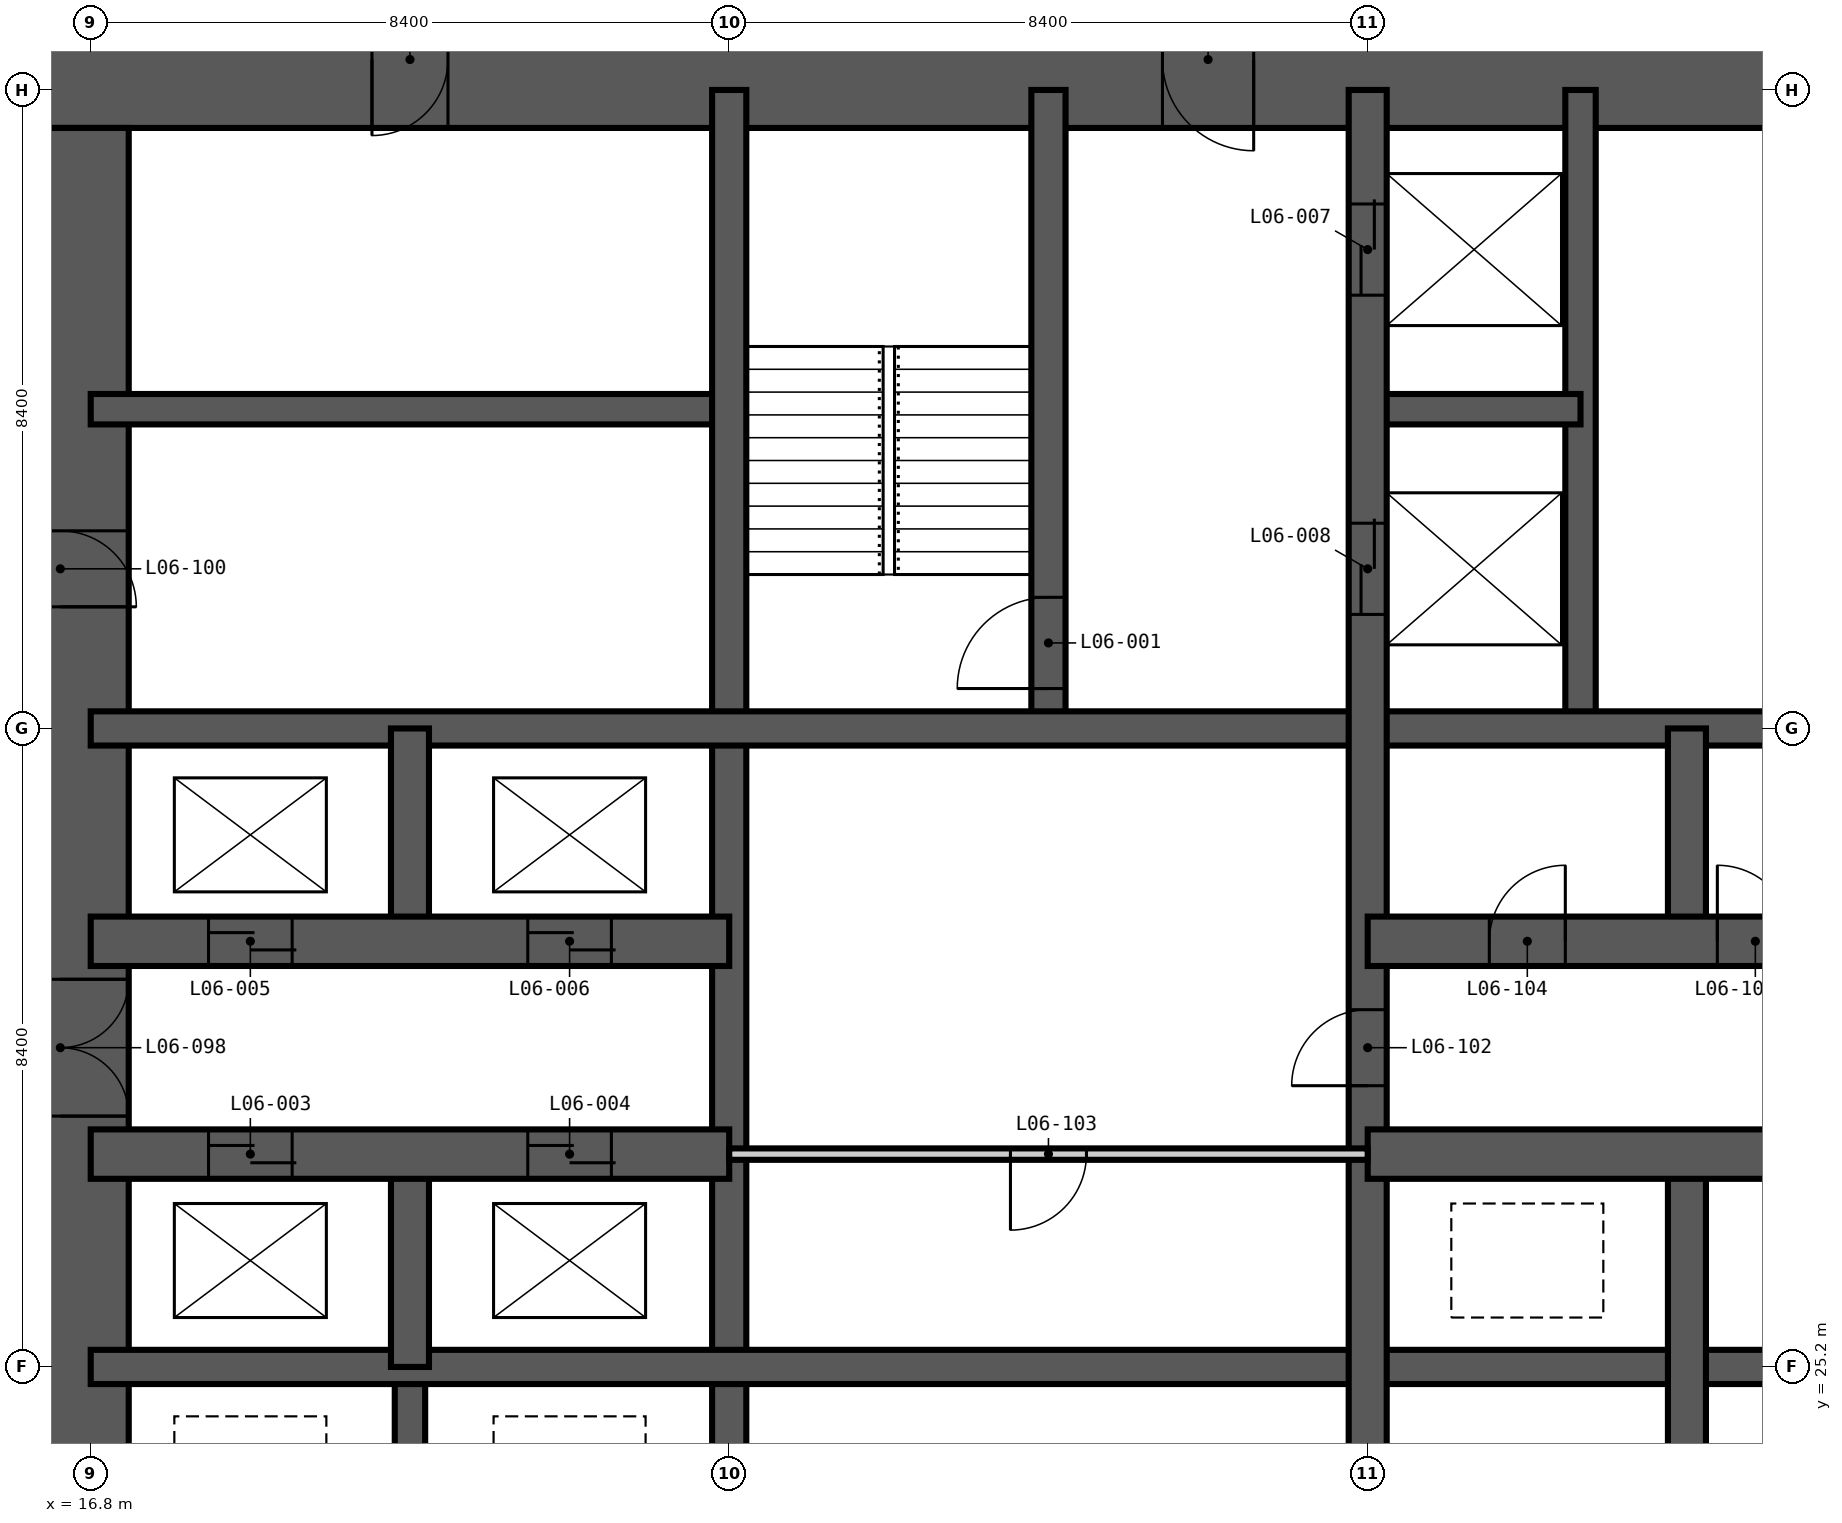
"""IFC4 building model, lengths in metres.
Left out: names, types, materials, properties, quantities, classifications, styles, units other than length and angle.
Written with IfcOpenShell. Run it as: python <this file> out.ifc"""

import sys

from ifc_helpers import new_model, si_unit, direction, frame, frame_2d, origin, place, context, subcontext, project, spatial, rectangle, extrude, element, fill, save


model = new_model("IFC4")
c1 = context("Model", 3, precision=1e-05, world=origin(), true_north=direction((0.0, 1.0)))
c2 = subcontext(c1, "Body", "Model", "MODEL_VIEW")
j1 = project(units=[si_unit("LENGTHUNIT", "METRE"), si_unit("PLANEANGLEUNIT", "RADIAN")], contexts=[c1])
p1 = place(None, origin())
s1 = spatial("IfcSite", under=j1, at=p1, CompositionType="ELEMENT")
p2 = place(p1, origin())
s2 = spatial("IfcBuilding", under=s1, at=p2, CompositionType="ELEMENT")
p3 = place(p2, frame((0.0, 0.0, 30.6)))
s3 = spatial("IfcBuildingStorey", under=s2, at=p3, CompositionType="ELEMENT", Elevation=30.6)
p4 = place(p3, frame((43.3, 42.4, -0.35), z_axis=(0.0, 0.0, 1.0), x_axis=(-1.0, 0.0, 0.0)))
e1 = element("IfcWall", 1, at=p4, inside=s3, PredefinedType="SHEAR", context=c2, shape_type="SweptSolid", body=[
    extrude(rectangle(XDim=27.8, YDim=1.8, at=frame_2d((13.9, 0.0))), origin(), (0.0, 0.0, 1.0), 3.6),
])
p5 = place(p4, frame((21.8, 0.0, 0.35)))
e2 = element("IfcOpeningElement", 2, at=p5, cuts=e1, PredefinedType="OPENING", context=c2, shape_type="SweptSolid", body=[
    extrude(rectangle(XDim=1.0, YDim=2.1, at=frame_2d((0.5, 1.05))), frame((0.0, 0.91, 0.0), z_axis=(0.0, -1.0, 0.0), x_axis=(1.0, 0.0, 0.0)), (0.0, 0.0, 1.0), 1.82),
])
p6 = place(p4, frame((11.2, 0.0, 0.35)))
e3 = element("IfcOpeningElement", 3, at=p6, cuts=e1, PredefinedType="OPENING", context=c2, shape_type="SweptSolid", body=[
    extrude(rectangle(XDim=1.2, YDim=2.2, at=frame_2d((0.6, 1.1))), frame((0.0, 0.91, 0.0), z_axis=(0.0, -1.0, 0.0), x_axis=(1.0, 0.0, 0.0)), (0.0, 0.0, 1.0), 1.82),
])
p7 = place(p3, frame((16.4, 41.5, -0.35), z_axis=(0.0, 0.0, 1.0), x_axis=(0.0, -1.0, 0.0)))
e4 = element("IfcWall", 4, at=p7, inside=s3, PredefinedType="SHEAR", context=c2, shape_type="SweptSolid", body=[
    extrude(rectangle(XDim=24.2, YDim=1.8, at=frame_2d((12.1, 0.0))), origin(), (0.0, 0.0, 1.0), 3.6),
])
p8 = place(p7, frame((11.2, 0.0, 0.35)))
e5 = element("IfcOpeningElement", 5, at=p8, cuts=e4, PredefinedType="OPENING", context=c2, shape_type="SweptSolid", body=[
    extrude(rectangle(XDim=1.8, YDim=2.2, at=frame_2d((0.9, 1.1))), frame((0.0, 0.91, 0.0), z_axis=(0.0, -1.0, 0.0), x_axis=(1.0, 0.0, 0.0)), (0.0, 0.0, 1.0), 1.82),
])
p9 = place(p7, frame((20.0, 0.0, 0.35)))
e6 = element("IfcOpeningElement", 6, at=p9, cuts=e4, PredefinedType="OPENING", context=c2, shape_type="SweptSolid", body=[
    extrude(rectangle(XDim=1.0, YDim=2.1, at=frame_2d((0.5, 1.05))), frame((0.0, 0.91, 0.0), z_axis=(0.0, -1.0, 0.0), x_axis=(1.0, 0.0, 0.0)), (0.0, 0.0, 1.0), 1.82),
])
p10 = place(p7, frame((5.3, 0.0, 0.35)))
e7 = element("IfcOpeningElement", 7, at=p10, cuts=e4, PredefinedType="OPENING", context=c2, shape_type="SweptSolid", body=[
    extrude(rectangle(XDim=1.0, YDim=2.1, at=frame_2d((0.5, 1.05))), frame((0.0, 0.91, 0.0), z_axis=(0.0, -1.0, 0.0), x_axis=(1.0, 0.0, 0.0)), (0.0, 0.0, 1.0), 1.82),
])
p11 = place(p3, frame((21.0, 22.4, -0.35), z_axis=(0.0, 0.0, 1.0), x_axis=(0.0, 1.0, 0.0)))
e8 = element("IfcWall", 8, at=p11, inside=s3, PredefinedType="SHEAR", context=c2, shape_type="SweptSolid", body=[
    extrude(rectangle(XDim=2.8, YDim=0.4, at=frame_2d((1.4, 0.0))), origin(), (0.0, 0.0, 1.0), 3.6),
])
for number, where, z_axis, x_axis in (
    (9, (36.4, 33.6, -0.35), (0.0, 0.0, 1.0), (0.0, 1.0, 0.0)),
    (10, (16.8, 37.8, -0.35), (0.0, 0.0, 1.0), (1.0, 0.0, 0.0)),
):
    element("IfcWall", number, at=place(p3, frame(where, z_axis=z_axis, x_axis=x_axis)), inside=s3, PredefinedType="SHEAR", context=c2, shape_type="SweptSolid", body=[
        extrude(rectangle(XDim=8.4, YDim=0.4, at=frame_2d((4.2, 0.0))), origin(), (0.0, 0.0, 1.0), 3.6),
    ])
p12 = place(p3, frame((33.6, 37.8, -0.35), z_axis=(0.0, 0.0, 1.0), x_axis=(1.0, 0.0, 0.0)))
e11 = element("IfcWall", 11, at=p12, inside=s3, PredefinedType="SHEAR", context=c2, shape_type="SweptSolid", body=[
    extrude(rectangle(XDim=2.8, YDim=0.4, at=frame_2d((1.4, 0.0))), origin(), (0.0, 0.0, 1.0), 3.6),
])
p13 = place(p3, frame((25.2, 16.8, -0.35), z_axis=(0.0, 0.0, 1.0), x_axis=(0.0, 1.0, 0.0)))
e12 = element("IfcWall", 12, at=p13, inside=s3, PredefinedType="SHEAR", context=c2, shape_type="SweptSolid", body=[
    extrude(rectangle(XDim=25.2, YDim=0.45, at=frame_2d((12.6, 0.0))), origin(), (0.0, 0.0, 1.0), 3.6),
])
p14 = place(p3, frame((29.4, 33.6, -0.35), z_axis=(0.0, 0.0, 1.0), x_axis=(0.0, 1.0, 0.0)))
e13 = element("IfcWall", 13, at=p14, inside=s3, PredefinedType="SHEAR", context=c2, shape_type="SweptSolid", body=[
    extrude(rectangle(XDim=8.4, YDim=0.45, at=frame_2d((4.2, 0.0))), origin(), (0.0, 0.0, 1.0), 3.6),
])
p15 = place(p14, frame((0.525, 0.0, 0.35)))
e14 = element("IfcOpeningElement", 14, at=p15, cuts=e13, PredefinedType="OPENING", context=c2, shape_type="SweptSolid", body=[
    extrude(rectangle(XDim=1.2, YDim=2.2, at=frame_2d((0.6, 1.1))), frame((0.0, 0.235, 0.0), z_axis=(0.0, -1.0, 0.0), x_axis=(1.0, 0.0, 0.0)), (0.0, 0.0, 1.0), 0.47),
])
for number, where, z_axis, x_axis in (
    (15, (16.8, 25.2, -0.35), (0.0, 0.0, 1.0), (1.0, 0.0, 0.0)),
    (16, (16.8, 33.6, -0.35), (0.0, 0.0, 1.0), (1.0, 0.0, 0.0)),
):
    element("IfcWall", number, at=place(p3, frame(where, z_axis=z_axis, x_axis=x_axis)), inside=s3, PredefinedType="SHEAR", context=c2, shape_type="SweptSolid", body=[
        extrude(rectangle(XDim=25.2, YDim=0.45, at=frame_2d((12.6, 0.0))), origin(), (0.0, 0.0, 1.0), 3.6),
    ])
for number, where, z_axis, x_axis in (
    (17, (21.0, 25.2, -0.35), (0.0, 0.0, 1.0), (0.0, 1.0, 0.0)),
    (18, (21.0, 30.8, -0.35), (0.0, 0.0, 1.0), (0.0, 1.0, 0.0)),
):
    element("IfcWall", number, at=place(p3, frame(where, z_axis=z_axis, x_axis=x_axis)), inside=s3, PredefinedType="SHEAR", context=c2, shape_type="SweptSolid", body=[
        extrude(rectangle(XDim=2.8, YDim=0.5, at=frame_2d((1.4, 0.0))), origin(), (0.0, 0.0, 1.0), 3.6),
    ])
p16 = place(p3, frame((33.6, 16.8, -0.35), z_axis=(0.0, 0.0, 1.0), x_axis=(0.0, 1.0, 0.0)))
e19 = element("IfcWall", 19, at=p16, inside=s3, PredefinedType="SHEAR", context=c2, shape_type="SweptSolid", body=[
    extrude(rectangle(XDim=25.2, YDim=0.5, at=frame_2d((12.6, 0.0))), origin(), (0.0, 0.0, 1.0), 3.6),
])
p17 = place(p16, frame((22.5, 0.0, 0.35)))
e20 = element("IfcOpeningElement", 20, at=p17, cuts=e19, PredefinedType="OPENING", context=c2, shape_type="SweptSolid", body=[
    extrude(rectangle(XDim=1.2, YDim=2.2, at=frame_2d((0.6, 1.1))), frame((0.0, 0.26, 0.0), z_axis=(0.0, -1.0, 0.0), x_axis=(1.0, 0.0, 0.0)), (0.0, 0.0, 1.0), 0.52),
])
p18 = place(p16, frame((18.3, 0.0, 0.35)))
e21 = element("IfcOpeningElement", 21, at=p18, cuts=e19, PredefinedType="OPENING", context=c2, shape_type="SweptSolid", body=[
    extrude(rectangle(XDim=1.2, YDim=2.2, at=frame_2d((0.6, 1.1))), frame((0.0, 0.26, 0.0), z_axis=(0.0, -1.0, 0.0), x_axis=(1.0, 0.0, 0.0)), (0.0, 0.0, 1.0), 0.52),
])
p19 = place(p16, frame((12.1, 0.0, 0.35)))
e22 = element("IfcOpeningElement", 22, at=p19, cuts=e19, PredefinedType="OPENING", context=c2, shape_type="SweptSolid", body=[
    extrude(rectangle(XDim=1.0, YDim=2.1, at=frame_2d((0.5, 1.05))), frame((0.0, 0.26, 0.0), z_axis=(0.0, -1.0, 0.0), x_axis=(1.0, 0.0, 0.0)), (0.0, 0.0, 1.0), 0.52),
])
p20 = place(p3, frame((37.8, 16.8, -0.35), z_axis=(0.0, 0.0, 1.0), x_axis=(0.0, 1.0, 0.0)))
e23 = element("IfcWall", 23, at=p20, inside=s3, PredefinedType="SHEAR", context=c2, shape_type="SweptSolid", body=[
    extrude(rectangle(XDim=11.2, YDim=0.5, at=frame_2d((5.6, 0.0))), origin(), (0.0, 0.0, 1.0), 3.6),
])
p21 = place(p3, frame((37.8, 30.8, -0.35), z_axis=(0.0, 0.0, 1.0), x_axis=(0.0, 1.0, 0.0)))
e24 = element("IfcWall", 24, at=p21, inside=s3, PredefinedType="SHEAR", context=c2, shape_type="SweptSolid", body=[
    extrude(rectangle(XDim=2.8, YDim=0.5, at=frame_2d((1.4, 0.0))), origin(), (0.0, 0.0, 1.0), 3.6),
])
p22 = place(p3, frame((16.8, 28.0, -0.35), z_axis=(0.0, 0.0, 1.0), x_axis=(1.0, 0.0, 0.0)))
e25 = element("IfcWall", 25, at=p22, inside=s3, PredefinedType="SHEAR", context=c2, shape_type="SweptSolid", body=[
    extrude(rectangle(XDim=8.4, YDim=0.65, at=frame_2d((4.2, 0.0))), origin(), (0.0, 0.0, 1.0), 3.6),
])
p23 = place(p22, frame((1.55, 0.0, 0.35)))
e26 = element("IfcOpeningElement", 26, at=p23, cuts=e25, PredefinedType="OPENING", context=c2, shape_type="SweptSolid", body=[
    extrude(rectangle(XDim=1.1, YDim=2.2, at=frame_2d((0.55, 1.1))), frame((0.0, 0.335, 0.0), z_axis=(0.0, -1.0, 0.0), x_axis=(1.0, 0.0, 0.0)), (0.0, 0.0, 1.0), 0.67),
])
p24 = place(p22, frame((5.75, 0.0, 0.35)))
e27 = element("IfcOpeningElement", 27, at=p24, cuts=e25, PredefinedType="OPENING", context=c2, shape_type="SweptSolid", body=[
    extrude(rectangle(XDim=1.1, YDim=2.2, at=frame_2d((0.55, 1.1))), frame((0.0, 0.335, 0.0), z_axis=(0.0, -1.0, 0.0), x_axis=(1.0, 0.0, 0.0)), (0.0, 0.0, 1.0), 0.67),
])
p25 = place(p3, frame((33.6, 28.0, -0.35), z_axis=(0.0, 0.0, 1.0), x_axis=(1.0, 0.0, 0.0)))
e28 = element("IfcWall", 28, at=p25, inside=s3, PredefinedType="SHEAR", context=c2, shape_type="SweptSolid", body=[
    extrude(rectangle(XDim=8.4, YDim=0.65, at=frame_2d((4.2, 0.0))), origin(), (0.0, 0.0, 1.0), 3.6),
])
p26 = place(p3, frame((16.8, 30.8, -0.35), z_axis=(0.0, 0.0, 1.0), x_axis=(1.0, 0.0, 0.0)))
e29 = element("IfcWall", 29, at=p26, inside=s3, PredefinedType="SHEAR", context=c2, shape_type="SweptSolid", body=[
    extrude(rectangle(XDim=8.4, YDim=0.65, at=frame_2d((4.2, 0.0))), origin(), (0.0, 0.0, 1.0), 3.6),
])
p27 = place(p26, frame((1.55, 0.0, 0.35)))
e30 = element("IfcOpeningElement", 30, at=p27, cuts=e29, PredefinedType="OPENING", context=c2, shape_type="SweptSolid", body=[
    extrude(rectangle(XDim=1.1, YDim=2.2, at=frame_2d((0.55, 1.1))), frame((0.0, 0.335, 0.0), z_axis=(0.0, -1.0, 0.0), x_axis=(1.0, 0.0, 0.0)), (0.0, 0.0, 1.0), 0.67),
])
p28 = place(p26, frame((5.75, 0.0, 0.35)))
e31 = element("IfcOpeningElement", 31, at=p28, cuts=e29, PredefinedType="OPENING", context=c2, shape_type="SweptSolid", body=[
    extrude(rectangle(XDim=1.1, YDim=2.2, at=frame_2d((0.55, 1.1))), frame((0.0, 0.335, 0.0), z_axis=(0.0, -1.0, 0.0), x_axis=(1.0, 0.0, 0.0)), (0.0, 0.0, 1.0), 0.67),
])
p29 = place(p3, frame((33.6, 30.8, -0.35), z_axis=(0.0, 0.0, 1.0), x_axis=(1.0, 0.0, 0.0)))
e32 = element("IfcWall", 32, at=p29, inside=s3, PredefinedType="SHEAR", context=c2, shape_type="SweptSolid", body=[
    extrude(rectangle(XDim=8.4, YDim=0.65, at=frame_2d((4.2, 0.0))), origin(), (0.0, 0.0, 1.0), 3.6),
])
p30 = place(p29, frame((1.6, 0.0, 0.35)))
e33 = element("IfcOpeningElement", 33, at=p30, cuts=e32, PredefinedType="OPENING", context=c2, shape_type="SweptSolid", body=[
    extrude(rectangle(XDim=1.0, YDim=2.1, at=frame_2d((0.5, 1.05))), frame((0.0, 0.335, 0.0), z_axis=(0.0, -1.0, 0.0), x_axis=(1.0, 0.0, 0.0)), (0.0, 0.0, 1.0), 0.67),
])
p31 = place(p29, frame((4.6, 0.0, 0.35)))
e34 = element("IfcOpeningElement", 34, at=p31, cuts=e32, PredefinedType="OPENING", context=c2, shape_type="SweptSolid", body=[
    extrude(rectangle(XDim=1.0, YDim=2.1, at=frame_2d((0.5, 1.05))), frame((0.0, 0.335, 0.0), z_axis=(0.0, -1.0, 0.0), x_axis=(1.0, 0.0, 0.0)), (0.0, 0.0, 1.0), 0.67),
])
p32 = place(p3, frame((25.2, 28.0, 0.0), z_axis=(0.0, 0.0, 1.0), x_axis=(1.0, 0.0, 0.0)))
e35 = element("IfcWall", 35, at=p32, inside=s3, PredefinedType="PARTITIONING", context=c2, shape_type="SweptSolid", body=[
    extrude(rectangle(XDim=8.4, YDim=0.15, at=frame_2d((4.2, 0.0))), origin(), (0.0, 0.0, 1.0), 3.25),
])
p33 = place(p32, frame((3.7, 0.0, 0.0)))
e36 = element("IfcOpeningElement", 36, at=p33, cuts=e35, PredefinedType="OPENING", context=c2, shape_type="SweptSolid", body=[
    extrude(rectangle(XDim=1.0, YDim=2.1, at=frame_2d((0.5, 1.05))), frame((0.0, 0.085, 0.0), z_axis=(0.0, -1.0, 0.0), x_axis=(1.0, 0.0, 0.0)), (0.0, 0.0, 1.0), 0.17),
])
p34 = place(p15, origin())
e37 = element("IfcDoor", 37, at=p34, inside=s3, OperationType="SINGLE_SWING_LEFT", PredefinedType="DOOR", context=c2, shape_type="SweptSolid", body=[
    extrude(rectangle(XDim=1.2, YDim=2.2, at=frame_2d((0.6, 1.1))), frame((0.0, 0.025, 0.0), z_axis=(0.0, -1.0, 0.0), x_axis=(1.0, 0.0, 0.0)), (0.0, 0.0, 1.0), 0.05),
])
fill(e14, e37)
p35 = place(p23, origin())
e38 = element("IfcDoor", 38, at=p35, inside=s3, OperationType="DOUBLE_DOOR_SLIDING", PredefinedType="DOOR", context=c2, shape_type="SweptSolid", body=[
    extrude(rectangle(XDim=1.1, YDim=2.2, at=frame_2d((0.55, 1.1))), frame((0.0, 0.025, 0.0), z_axis=(0.0, -1.0, 0.0), x_axis=(1.0, 0.0, 0.0)), (0.0, 0.0, 1.0), 0.05),
])
fill(e26, e38)
p36 = place(p24, origin())
e39 = element("IfcDoor", 39, at=p36, inside=s3, OperationType="DOUBLE_DOOR_SLIDING", PredefinedType="DOOR", context=c2, shape_type="SweptSolid", body=[
    extrude(rectangle(XDim=1.1, YDim=2.2, at=frame_2d((0.55, 1.1))), frame((0.0, 0.025, 0.0), z_axis=(0.0, -1.0, 0.0), x_axis=(1.0, 0.0, 0.0)), (0.0, 0.0, 1.0), 0.05),
])
fill(e27, e39)
p37 = place(p27, origin())
e40 = element("IfcDoor", 40, at=p37, inside=s3, OperationType="DOUBLE_DOOR_SLIDING", PredefinedType="DOOR", context=c2, shape_type="SweptSolid", body=[
    extrude(rectangle(XDim=1.1, YDim=2.2, at=frame_2d((0.55, 1.1))), frame((0.0, 0.025, 0.0), z_axis=(0.0, -1.0, 0.0), x_axis=(1.0, 0.0, 0.0)), (0.0, 0.0, 1.0), 0.05),
])
fill(e30, e40)
p38 = place(p28, origin())
e41 = element("IfcDoor", 41, at=p38, inside=s3, OperationType="DOUBLE_DOOR_SLIDING", PredefinedType="DOOR", context=c2, shape_type="SweptSolid", body=[
    extrude(rectangle(XDim=1.1, YDim=2.2, at=frame_2d((0.55, 1.1))), frame((0.0, 0.025, 0.0), z_axis=(0.0, -1.0, 0.0), x_axis=(1.0, 0.0, 0.0)), (0.0, 0.0, 1.0), 0.05),
])
fill(e31, e41)
p39 = place(p17, origin())
e42 = element("IfcDoor", 42, at=p39, inside=s3, OperationType="DOUBLE_DOOR_SLIDING", PredefinedType="DOOR", context=c2, shape_type="SweptSolid", body=[
    extrude(rectangle(XDim=1.2, YDim=2.2, at=frame_2d((0.6, 1.1))), frame((0.0, 0.025, 0.0), z_axis=(0.0, -1.0, 0.0), x_axis=(1.0, 0.0, 0.0)), (0.0, 0.0, 1.0), 0.05),
])
fill(e20, e42)
p40 = place(p18, origin())
e43 = element("IfcDoor", 43, at=p40, inside=s3, OperationType="DOUBLE_DOOR_SLIDING", PredefinedType="DOOR", context=c2, shape_type="SweptSolid", body=[
    extrude(rectangle(XDim=1.2, YDim=2.2, at=frame_2d((0.6, 1.1))), frame((0.0, 0.025, 0.0), z_axis=(0.0, -1.0, 0.0), x_axis=(1.0, 0.0, 0.0)), (0.0, 0.0, 1.0), 0.05),
])
fill(e21, e43)
p41 = place(p8, origin())
e44 = element("IfcDoor", 44, at=p41, inside=s3, OperationType="DOUBLE_DOOR_DOUBLE_SWING", PredefinedType="DOOR", context=c2, shape_type="SweptSolid", body=[
    extrude(rectangle(XDim=1.8, YDim=2.2, at=frame_2d((0.9, 1.1))), frame((0.0, 0.025, 0.0), z_axis=(0.0, -1.0, 0.0), x_axis=(1.0, 0.0, 0.0)), (0.0, 0.0, 1.0), 0.05),
])
fill(e5, e44)
p42 = place(p10, origin())
e45 = element("IfcDoor", 45, at=p42, inside=s3, OperationType="SINGLE_SWING_RIGHT", PredefinedType="DOOR", context=c2, shape_type="SweptSolid", body=[
    extrude(rectangle(XDim=1.0, YDim=2.1, at=frame_2d((0.5, 1.05))), frame((0.0, 0.025, 0.0), z_axis=(0.0, -1.0, 0.0), x_axis=(1.0, 0.0, 0.0)), (0.0, 0.0, 1.0), 0.05),
])
fill(e7, e45)
p43 = place(p5, origin())
e46 = element("IfcDoor", 46, at=p43, inside=s3, OperationType="SINGLE_SWING_RIGHT", PredefinedType="DOOR", context=c2, shape_type="SweptSolid", body=[
    extrude(rectangle(XDim=1.0, YDim=2.1, at=frame_2d((0.5, 1.05))), frame((0.0, 0.025, 0.0), z_axis=(0.0, -1.0, 0.0), x_axis=(1.0, 0.0, 0.0)), (0.0, 0.0, 1.0), 0.05),
])
fill(e2, e46)
p44 = place(p19, origin())
e47 = element("IfcDoor", 47, at=p44, inside=s3, OperationType="SINGLE_SWING_LEFT", PredefinedType="DOOR", context=c2, shape_type="SweptSolid", body=[
    extrude(rectangle(XDim=1.0, YDim=2.1, at=frame_2d((0.5, 1.05))), frame((0.0, 0.025, 0.0), z_axis=(0.0, -1.0, 0.0), x_axis=(1.0, 0.0, 0.0)), (0.0, 0.0, 1.0), 0.05),
])
fill(e22, e47)
p45 = place(p33, frame((1.0, 0.0, 0.0), z_axis=(0.0, 0.0, 1.0), x_axis=(-1.0, 0.0, 0.0)))
e48 = element("IfcDoor", 48, at=p45, inside=s3, OperationType="SINGLE_SWING_RIGHT", PredefinedType="DOOR", context=c2, shape_type="SweptSolid", body=[
    extrude(rectangle(XDim=1.0, YDim=2.1, at=frame_2d((0.5, 1.05))), frame((0.0, 0.025, 0.0), z_axis=(0.0, -1.0, 0.0), x_axis=(1.0, 0.0, 0.0)), (0.0, 0.0, 1.0), 0.05),
])
fill(e36, e48)
p46 = place(p30, origin())
e49 = element("IfcDoor", 49, at=p46, inside=s3, OperationType="SINGLE_SWING_RIGHT", PredefinedType="DOOR", context=c2, shape_type="SweptSolid", body=[
    extrude(rectangle(XDim=1.0, YDim=2.1, at=frame_2d((0.5, 1.05))), frame((0.0, 0.025, 0.0), z_axis=(0.0, -1.0, 0.0), x_axis=(1.0, 0.0, 0.0)), (0.0, 0.0, 1.0), 0.05),
])
fill(e33, e49)
p47 = place(p31, origin())
e50 = element("IfcDoor", 50, at=p47, inside=s3, OperationType="SINGLE_SWING_LEFT", PredefinedType="DOOR", context=c2, shape_type="SweptSolid", body=[
    extrude(rectangle(XDim=1.0, YDim=2.1, at=frame_2d((0.5, 1.05))), frame((0.0, 0.025, 0.0), z_axis=(0.0, -1.0, 0.0), x_axis=(1.0, 0.0, 0.0)), (0.0, 0.0, 1.0), 0.05),
])
fill(e34, e50)
p48 = place(p6, origin())
e51 = element("IfcDoor", 51, at=p48, inside=s3, OperationType="SINGLE_SWING_LEFT", PredefinedType="DOOR", context=c2, shape_type="SweptSolid", body=[
    extrude(rectangle(XDim=1.2, YDim=2.2, at=frame_2d((0.6, 1.1))), frame((0.0, 0.025, 0.0), z_axis=(0.0, -1.0, 0.0), x_axis=(1.0, 0.0, 0.0)), (0.0, 0.0, 1.0), 0.05),
])
fill(e3, e51)
save(model, sys.argv[1])
